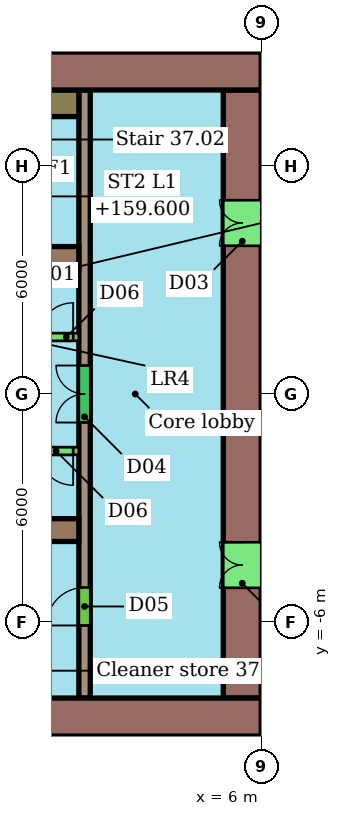
"""IFC4 building model, lengths in metres.
Left out: names, types, materials, properties, quantities, classifications, styles, units other than length and angle.
Written with IfcOpenShell. Run it as: python <this file> out.ifc"""

import sys

from ifc_helpers import new_model, si_unit, direction, frame, frame_2d, origin, place, context, subcontext, project, spatial, rectangle, extrude, element, fill, save


model = new_model("IFC4")
c1 = context("Model", 3, precision=1e-05, world=origin(), true_north=direction((0.0, 1.0)))
c2 = subcontext(c1, "Body", "Model", "MODEL_VIEW")
j1 = project(units=[si_unit("LENGTHUNIT", "METRE"), si_unit("PLANEANGLEUNIT", "RADIAN")], contexts=[c1])
p1 = place(None, origin())
s1 = spatial("IfcSite", under=j1, at=p1, CompositionType="ELEMENT")
p2 = place(p1, origin())
s2 = spatial("IfcBuilding", under=s1, at=p2, CompositionType="ELEMENT")
p3 = place(p2, frame((0.0, 0.0, 157.8)))
s3 = spatial("IfcBuildingStorey", under=s2, at=p3, CompositionType="ELEMENT", Elevation=157.8)
p4 = place(p3, frame((6.0, 8.5, 0.0), z_axis=(0.0, 0.0, 1.0), x_axis=(-1.0, 0.0, 0.0)))
e1 = element("IfcWall", 1, at=p4, inside=s3, PredefinedType="SHEAR", context=c2, shape_type="SweptSolid", body=[
    extrude(rectangle(XDim=12.0, YDim=1.0, at=frame_2d((6.0, 0.0))), origin(), (0.0, 0.0, 1.0), 3.3),
])
p5 = place(p4, frame((5.6, 0.0, 0.0)))
e2 = element("IfcOpeningElement", 2, at=p5, cuts=e1, PredefinedType="OPENING", context=c2, shape_type="SweptSolid", body=[
    extrude(rectangle(XDim=1.2, YDim=2.1, at=frame_2d((0.6, 1.05))), frame((0.0, 0.51, 0.0), z_axis=(0.0, -1.0, 0.0), x_axis=(1.0, 0.0, 0.0)), (0.0, 0.0, 1.0), 1.02),
])
p6 = place(p3, frame((-18.0, -8.5, 0.0), z_axis=(0.0, 0.0, 1.0), x_axis=(1.0, 0.0, 0.0)))
e3 = element("IfcWall", 3, at=p6, inside=s3, PredefinedType="SHEAR", context=c2, shape_type="SweptSolid", body=[
    extrude(rectangle(XDim=24.0, YDim=1.0, at=frame_2d((12.0, 0.0))), origin(), (0.0, 0.0, 1.0), 3.3),
])
p7 = place(p6, frame((6.0, 0.0, 0.0)))
e4 = element("IfcOpeningElement", 4, at=p7, cuts=e3, PredefinedType="OPENING", context=c2, shape_type="SweptSolid", body=[
    extrude(rectangle(XDim=1.2, YDim=2.1, at=frame_2d((0.6, 1.05))), frame((0.0, 0.51, 0.0), z_axis=(0.0, -1.0, 0.0), x_axis=(1.0, 0.0, 0.0)), (0.0, 0.0, 1.0), 1.02),
])
p8 = place(p3, frame((5.5, -8.0, 0.0), z_axis=(0.0, 0.0, 1.0), x_axis=(0.0, 1.0, 0.0)))
e5 = element("IfcWall", 5, at=p8, inside=s3, PredefinedType="SHEAR", context=c2, shape_type="SweptSolid", body=[
    extrude(rectangle(XDim=16.0, YDim=1.0, at=frame_2d((8.0, 0.0))), origin(), (0.0, 0.0, 1.0), 3.3),
])
p9 = place(p8, frame((2.9, 0.0, 0.0)))
e6 = element("IfcOpeningElement", 6, at=p9, cuts=e5, PredefinedType="OPENING", context=c2, shape_type="SweptSolid", body=[
    extrude(rectangle(XDim=1.2, YDim=2.1, at=frame_2d((0.6, 1.05))), frame((0.0, 0.51, 0.0), z_axis=(0.0, -1.0, 0.0), x_axis=(1.0, 0.0, 0.0)), (0.0, 0.0, 1.0), 1.02),
])
p10 = place(p8, frame((11.9, 0.0, 0.0)))
e7 = element("IfcOpeningElement", 7, at=p10, cuts=e5, PredefinedType="OPENING", context=c2, shape_type="SweptSolid", body=[
    extrude(rectangle(XDim=1.2, YDim=2.1, at=frame_2d((0.6, 1.05))), frame((0.0, 0.51, 0.0), z_axis=(0.0, -1.0, 0.0), x_axis=(1.0, 0.0, 0.0)), (0.0, 0.0, 1.0), 1.02),
])
for number, where, z_axis, x_axis in (
    (8, (-6.0, 3.58, 0.0), (0.0, 0.0, 1.0), (1.0, 0.0, 0.0)),
    (9, (-6.0, -3.58, 0.0), (0.0, 0.0, 1.0), (1.0, 0.0, 0.0)),
):
    element("IfcWall", number, at=place(p3, frame(where, z_axis=z_axis, x_axis=x_axis)), inside=s3, PredefinedType="SHEAR", context=c2, shape_type="SweptSolid", body=[
        extrude(rectangle(XDim=7.2, YDim=0.6, at=frame_2d((3.6, 0.0))), origin(), (0.0, 0.0, 1.0), 3.3),
    ])
p11 = place(p3, frame((1.35, -8.0, 0.0), z_axis=(0.0, 0.0, 1.0), x_axis=(0.0, 1.0, 0.0)))
e10 = element("IfcWall", 10, at=p11, inside=s3, PredefinedType="SHEAR", context=c2, shape_type="SweptSolid", body=[
    extrude(rectangle(XDim=16.0, YDim=0.3, at=frame_2d((8.0, 0.0))), origin(), (0.0, 0.0, 1.0), 3.3),
])
p12 = place(p11, frame((1.91, 0.0, 0.0)))
e11 = element("IfcOpeningElement", 11, at=p12, cuts=e10, PredefinedType="OPENING", context=c2, shape_type="SweptSolid", body=[
    extrude(rectangle(XDim=1.0, YDim=2.1, at=frame_2d((0.5, 1.05))), frame((0.0, 0.16, 0.0), z_axis=(0.0, -1.0, 0.0), x_axis=(1.0, 0.0, 0.0)), (0.0, 0.0, 1.0), 0.32),
])
p13 = place(p11, frame((7.25, 0.0, 0.0)))
e12 = element("IfcOpeningElement", 12, at=p13, cuts=e10, PredefinedType="OPENING", context=c2, shape_type="SweptSolid", body=[
    extrude(rectangle(XDim=1.5, YDim=2.1, at=frame_2d((0.75, 1.05))), frame((0.0, 0.16, 0.0), z_axis=(0.0, -1.0, 0.0), x_axis=(1.0, 0.0, 0.0)), (0.0, 0.0, 1.0), 0.32),
])
p14 = place(p3, frame((-13.2, 1.5, 0.0), z_axis=(0.0, 0.0, 1.0), x_axis=(1.0, 0.0, 0.0)))
e13 = element("IfcWall", 13, at=p14, inside=s3, PredefinedType="SHEAR", context=c2, shape_type="SweptSolid", body=[
    extrude(rectangle(XDim=14.4, YDim=0.2, at=frame_2d((7.2, 0.0))), origin(), (0.0, 0.0, 1.0), 3.3),
])
p15 = place(p14, frame((0.546, 0.0, 0.0)))
e14 = element("IfcOpeningElement", 14, at=p15, cuts=e13, PredefinedType="OPENING", context=c2, shape_type="SweptSolid", body=[
    extrude(rectangle(XDim=1.1, YDim=2.1, at=frame_2d((0.55, 1.05))), frame((0.0, 0.11, 0.0), z_axis=(0.0, -1.0, 0.0), x_axis=(1.0, 0.0, 0.0)), (0.0, 0.0, 1.0), 0.22),
])
p16 = place(p14, frame((2.988, 0.0, 0.0)))
e15 = element("IfcOpeningElement", 15, at=p16, cuts=e13, PredefinedType="OPENING", context=c2, shape_type="SweptSolid", body=[
    extrude(rectangle(XDim=1.1, YDim=2.1, at=frame_2d((0.55, 1.05))), frame((0.0, 0.11, 0.0), z_axis=(0.0, -1.0, 0.0), x_axis=(1.0, 0.0, 0.0)), (0.0, 0.0, 1.0), 0.22),
])
p17 = place(p14, frame((5.429, 0.0, 0.0)))
e16 = element("IfcOpeningElement", 16, at=p17, cuts=e13, PredefinedType="OPENING", context=c2, shape_type="SweptSolid", body=[
    extrude(rectangle(XDim=1.1, YDim=2.1, at=frame_2d((0.55, 1.05))), frame((0.0, 0.11, 0.0), z_axis=(0.0, -1.0, 0.0), x_axis=(1.0, 0.0, 0.0)), (0.0, 0.0, 1.0), 0.22),
])
p18 = place(p14, frame((7.871, 0.0, 0.0)))
e17 = element("IfcOpeningElement", 17, at=p18, cuts=e13, PredefinedType="OPENING", context=c2, shape_type="SweptSolid", body=[
    extrude(rectangle(XDim=1.1, YDim=2.1, at=frame_2d((0.55, 1.05))), frame((0.0, 0.11, 0.0), z_axis=(0.0, -1.0, 0.0), x_axis=(1.0, 0.0, 0.0)), (0.0, 0.0, 1.0), 0.22),
])
p19 = place(p14, frame((10.21, 0.0, 0.0)))
e18 = element("IfcOpeningElement", 18, at=p19, cuts=e13, PredefinedType="OPENING", context=c2, shape_type="SweptSolid", body=[
    extrude(rectangle(XDim=1.0, YDim=2.1, at=frame_2d((0.5, 1.05))), frame((0.0, 0.11, 0.0), z_axis=(0.0, -1.0, 0.0), x_axis=(1.0, 0.0, 0.0)), (0.0, 0.0, 1.0), 0.22),
])
p20 = place(p14, frame((13.35, 0.0, 0.0)))
e19 = element("IfcOpeningElement", 19, at=p20, cuts=e13, PredefinedType="OPENING", context=c2, shape_type="SweptSolid", body=[
    extrude(rectangle(XDim=0.9, YDim=2.1, at=frame_2d((0.45, 1.05))), frame((0.0, 0.11, 0.0), z_axis=(0.0, -1.0, 0.0), x_axis=(1.0, 0.0, 0.0)), (0.0, 0.0, 1.0), 0.22),
])
p21 = place(p3, frame((1.2, -1.5, 0.0), z_axis=(0.0, 0.0, 1.0), x_axis=(-1.0, 0.0, 0.0)))
e20 = element("IfcWall", 20, at=p21, inside=s3, PredefinedType="SHEAR", context=c2, shape_type="SweptSolid", body=[
    extrude(rectangle(XDim=14.4, YDim=0.2, at=frame_2d((7.2, 0.0))), origin(), (0.0, 0.0, 1.0), 3.3),
])
p22 = place(p21, frame((7.821, 0.0, 0.0)))
e21 = element("IfcOpeningElement", 21, at=p22, cuts=e20, PredefinedType="OPENING", context=c2, shape_type="SweptSolid", body=[
    extrude(rectangle(XDim=1.2, YDim=2.1, at=frame_2d((0.6, 1.05))), frame((0.0, 0.11, 0.0), z_axis=(0.0, -1.0, 0.0), x_axis=(1.0, 0.0, 0.0)), (0.0, 0.0, 1.0), 0.22),
])
p23 = place(p21, frame((0.15, 0.0, 0.0)))
e22 = element("IfcOpeningElement", 22, at=p23, cuts=e20, PredefinedType="OPENING", context=c2, shape_type="SweptSolid", body=[
    extrude(rectangle(XDim=0.9, YDim=2.1, at=frame_2d((0.45, 1.05))), frame((0.0, 0.11, 0.0), z_axis=(0.0, -1.0, 0.0), x_axis=(1.0, 0.0, 0.0)), (0.0, 0.0, 1.0), 0.22),
])
p24 = place(p3, frame((0.4, 7.65, 0.0), z_axis=(0.0, 0.0, 1.0), x_axis=(1.0, 0.0, 0.0)))
e23 = element("IfcWall", 23, at=p24, inside=s3, PredefinedType="SHEAR", context=c2, shape_type="SweptSolid", body=[
    extrude(rectangle(XDim=0.8, YDim=0.7, at=frame_2d((0.4, 0.0))), origin(), (0.0, 0.0, 1.0), 3.3),
])
p25 = place(p9, origin())
e24 = element("IfcDoor", 24, at=p25, inside=s3, OperationType="DOUBLE_DOOR_SINGLE_SWING", PredefinedType="NOTDEFINED", context=c2, shape_type="SweptSolid", body=[
    extrude(rectangle(XDim=1.2, YDim=2.1, at=frame_2d((0.6, 1.05))), frame((0.0, 0.025, 0.0), z_axis=(0.0, -1.0, 0.0), x_axis=(1.0, 0.0, 0.0)), (0.0, 0.0, 1.0), 0.05),
])
fill(e6, e24)
p26 = place(p10, origin())
e25 = element("IfcDoor", 25, at=p26, inside=s3, OperationType="DOUBLE_DOOR_SINGLE_SWING", PredefinedType="NOTDEFINED", context=c2, shape_type="SweptSolid", body=[
    extrude(rectangle(XDim=1.2, YDim=2.1, at=frame_2d((0.6, 1.05))), frame((0.0, 0.025, 0.0), z_axis=(0.0, -1.0, 0.0), x_axis=(1.0, 0.0, 0.0)), (0.0, 0.0, 1.0), 0.05),
])
fill(e7, e25)
p27 = place(p12, origin())
e26 = element("IfcDoor", 26, at=p27, inside=s3, OperationType="SINGLE_SWING_LEFT", PredefinedType="NOTDEFINED", context=c2, shape_type="SweptSolid", body=[
    extrude(rectangle(XDim=1.0, YDim=2.1, at=frame_2d((0.5, 1.05))), frame((0.0, 0.025, 0.0), z_axis=(0.0, -1.0, 0.0), x_axis=(1.0, 0.0, 0.0)), (0.0, 0.0, 1.0), 0.05),
])
fill(e11, e26)
p28 = place(p13, origin())
e27 = element("IfcDoor", 27, at=p28, inside=s3, OperationType="DOUBLE_DOOR_SINGLE_SWING", PredefinedType="NOTDEFINED", context=c2, shape_type="SweptSolid", body=[
    extrude(rectangle(XDim=1.5, YDim=2.1, at=frame_2d((0.75, 1.05))), frame((0.0, 0.025, 0.0), z_axis=(0.0, -1.0, 0.0), x_axis=(1.0, 0.0, 0.0)), (0.0, 0.0, 1.0), 0.05),
])
fill(e12, e27)
p29 = place(p20, origin())
e28 = element("IfcDoor", 28, at=p29, inside=s3, OperationType="SINGLE_SWING_RIGHT", PredefinedType="NOTDEFINED", context=c2, shape_type="SweptSolid", body=[
    extrude(rectangle(XDim=0.9, YDim=2.1, at=frame_2d((0.45, 1.05))), frame((0.0, 0.025, 0.0), z_axis=(0.0, -1.0, 0.0), x_axis=(1.0, 0.0, 0.0)), (0.0, 0.0, 1.0), 0.05),
])
fill(e19, e28)
p30 = place(p23, origin())
e29 = element("IfcDoor", 29, at=p30, inside=s3, OperationType="SINGLE_SWING_LEFT", PredefinedType="NOTDEFINED", context=c2, shape_type="SweptSolid", body=[
    extrude(rectangle(XDim=0.9, YDim=2.1, at=frame_2d((0.45, 1.05))), frame((0.0, 0.025, 0.0), z_axis=(0.0, -1.0, 0.0), x_axis=(1.0, 0.0, 0.0)), (0.0, 0.0, 1.0), 0.05),
])
fill(e22, e29)
save(model, sys.argv[1])
